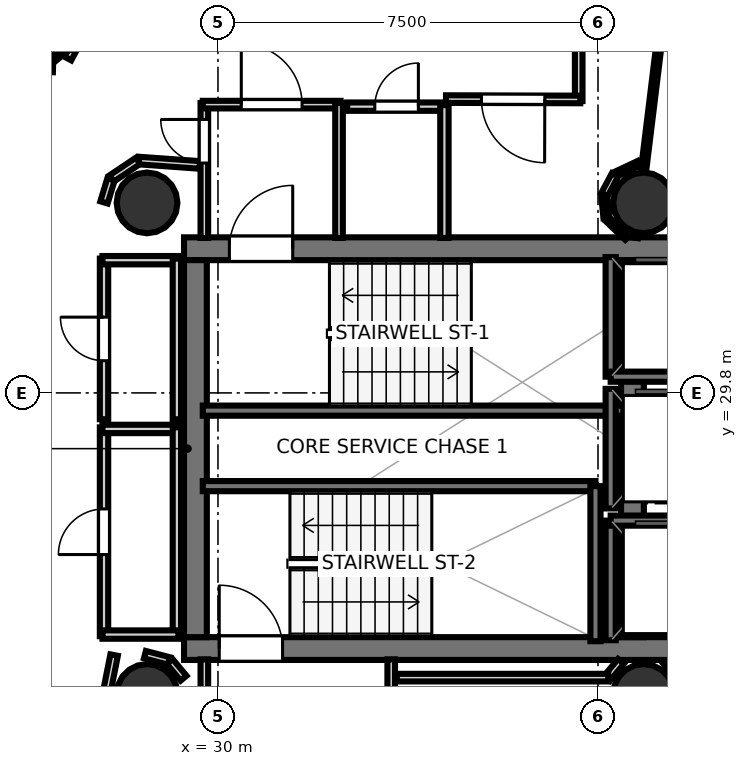
"""IFC4 building model, lengths in metres.
Left out: names, types, materials, properties, quantities, classifications, styles, units other than length and angle.
Written with IfcOpenShell. Run it as: python <this file> out.ifc"""

import sys

from ifc_helpers import new_model, si_unit, direction, frame, frame_2d, origin, origin_2d, place, context, subcontext, project, spatial, rectangle, hollow_circle, extrude, element, fill, save


model = new_model("IFC4")
c1 = context("Model", 3, precision=1e-05, world=origin(), true_north=direction((0.0, 1.0)))
c2 = subcontext(c1, "Body", "Model", "MODEL_VIEW")
j1 = project(units=[si_unit("LENGTHUNIT", "METRE"), si_unit("PLANEANGLEUNIT", "RADIAN")], contexts=[c1])
p1 = place(None, origin())
s1 = spatial("IfcSite", under=j1, at=p1, CompositionType="ELEMENT")
p2 = place(p1, origin())
s2 = spatial("IfcBuilding", under=s1, at=p2, CompositionType="ELEMENT")
p3 = place(p2, frame((0.0, 0.0, 207.7)))
s3 = spatial("IfcBuildingStorey", under=s2, at=p3, CompositionType="ELEMENT", Elevation=207.7)
p4 = place(p3, frame((29.33, 32.645, 0.0), z_axis=(0.0, 0.0, 1.0), x_axis=(1.0, 0.0, 0.0)))
e1 = element("IfcWall", 1, at=p4, inside=s3, PredefinedType="SHEAR", context=c2, shape_type="SweptSolid", body=[
    extrude(rectangle(XDim=10.52, YDim=0.45, at=frame_2d((5.26, 0.0))), origin(), (0.0, 0.0, 1.0), 3.52),
])
p5 = place(p4, frame((0.895, 0.0, 0.0)))
e2 = element("IfcOpeningElement", 2, at=p5, cuts=e1, PredefinedType="OPENING", context=c2, shape_type="SweptSolid", body=[
    extrude(rectangle(XDim=1.25, YDim=2.15, at=frame_2d((0.625, 1.075))), frame((0.0, 0.235, 0.0), z_axis=(0.0, -1.0, 0.0), x_axis=(1.0, 0.0, 0.0)), (0.0, 0.0, 1.0), 0.47),
])
p6 = place(p3, frame((29.33, 24.755, 0.0), z_axis=(0.0, 0.0, 1.0), x_axis=(1.0, 0.0, 0.0)))
e3 = element("IfcWall", 3, at=p6, inside=s3, PredefinedType="SHEAR", context=c2, shape_type="SweptSolid", body=[
    extrude(rectangle(XDim=10.52, YDim=0.45, at=frame_2d((5.26, 0.0))), origin(), (0.0, 0.0, 1.0), 3.52),
])
p7 = place(p6, frame((0.695, 0.0, 0.0)))
e4 = element("IfcOpeningElement", 4, at=p7, cuts=e3, PredefinedType="OPENING", context=c2, shape_type="SweptSolid", body=[
    extrude(rectangle(XDim=1.25, YDim=2.15, at=frame_2d((0.625, 1.075))), frame((0.0, 0.235, 0.0), z_axis=(0.0, -1.0, 0.0), x_axis=(1.0, 0.0, 0.0)), (0.0, 0.0, 1.0), 0.47),
])
for number, where, z_axis, x_axis in (
    (5, (29.555, 24.98, 0.0), (0.0, 0.0, 1.0), (0.0, 1.0, 0.0)),
    (6, (38.18, 24.98, 0.0), (0.0, 0.0, 1.0), (0.0, 1.0, 0.0)),
):
    element("IfcWall", number, at=place(p3, frame(where, z_axis=z_axis, x_axis=x_axis)), inside=s3, PredefinedType="SHEAR", context=c2, shape_type="SweptSolid", body=[
        extrude(rectangle(XDim=7.44, YDim=0.45, at=frame_2d((3.72, 0.0))), origin(), (0.0, 0.0, 1.0), 3.52),
    ])
for number, where, z_axis, x_axis in (
    (7, (28.6, 33.55, 0.0), (0.0, 0.0, 1.0), (1.0, 0.0, 0.0)),
    (8, (28.6, 23.85, 0.0), (0.0, 0.0, 1.0), (1.0, 0.0, 0.0)),
    (9, (38.4, 33.55, 0.0), (0.0, 0.0, 1.0), (1.0, 0.0, 0.0)),
    (10, (38.4, 23.85, 0.0), (0.0, 0.0, 1.0), (1.0, 0.0, 0.0)),
    (11, (26.431, 36.992, 0.0), (0.0, 0.0, 1.0), (1.0, 0.0, 0.0)),
):
    element("IfcColumn", number, at=place(p3, frame(where, z_axis=z_axis, x_axis=x_axis)), inside=s3, PredefinedType="COLUMN", context=c2, shape_type="SweptSolid", body=[
        extrude(hollow_circle(Radius=0.6, WallThickness=0.03, at=origin_2d()), origin(), (0.0, 0.0, 1.0), 3.7),
    ])
p8 = place(p3, frame((29.7, 29.45, 0.0), z_axis=(0.0, 0.0, 1.0), x_axis=(1.0, 0.0, 0.0)))
e12 = element("IfcWall", 12, at=p8, inside=s3, PredefinedType="SOLIDWALL", context=c2, shape_type="SweptSolid", body=[
    extrude(rectangle(XDim=8.3, YDim=0.2, at=frame_2d((4.15, 0.0))), origin(), (0.0, 0.0, 1.0), 3.52),
])
p9 = place(p3, frame((29.7, 27.96, 0.0), z_axis=(0.0, 0.0, 1.0), x_axis=(1.0, 0.0, 0.0)))
e13 = element("IfcWall", 13, at=p9, inside=s3, PredefinedType="SOLIDWALL", context=c2, shape_type="SweptSolid", body=[
    extrude(rectangle(XDim=7.75, YDim=0.2, at=frame_2d((3.875, 0.0))), origin(), (0.0, 0.0, 1.0), 3.52),
])
p10 = place(p3, frame((37.45, 24.9, 0.0), z_axis=(0.0, 0.0, 1.0), x_axis=(0.0, 1.0, 0.0)))
e14 = element("IfcWall", 14, at=p10, inside=s3, PredefinedType="SOLIDWALL", context=c2, shape_type="SweptSolid", body=[
    extrude(rectangle(XDim=3.06, YDim=0.2, at=frame_2d((1.53, 0.0))), origin(), (0.0, 0.0, 1.0), 3.52),
])
p11 = place(p3, frame((37.75, 30.12, 0.0), z_axis=(0.0, 0.0, 1.0), x_axis=(0.0, 1.0, 0.0)))
e15 = element("IfcWall", 15, at=p11, inside=s3, PredefinedType="SOLIDWALL", context=c2, shape_type="SweptSolid", body=[
    extrude(rectangle(XDim=2.36, YDim=0.2, at=frame_2d((1.18, 0.0))), origin(), (0.0, 0.0, 1.0), 3.52),
])
p12 = place(p3, frame((37.75, 30.12, 0.0), z_axis=(0.0, 0.0, 1.0), x_axis=(1.0, 0.0, 0.0)))
e16 = element("IfcWall", 16, at=p12, inside=s3, PredefinedType="SOLIDWALL", context=c2, shape_type="SweptSolid", body=[
    extrude(rectangle(XDim=2.1, YDim=0.2, at=frame_2d((1.05, 0.0))), origin(), (0.0, 0.0, 1.0), 3.52),
])
p13 = place(p3, frame((37.75, 24.92, 0.0), z_axis=(0.0, 0.0, 1.0), x_axis=(0.0, 1.0, 0.0)))
e17 = element("IfcWall", 17, at=p13, inside=s3, PredefinedType="SOLIDWALL", context=c2, shape_type="SweptSolid", body=[
    extrude(rectangle(XDim=2.36, YDim=0.2, at=frame_2d((1.18, 0.0))), origin(), (0.0, 0.0, 1.0), 3.52),
])
p14 = place(p3, frame((37.75, 27.28, 0.0), z_axis=(0.0, 0.0, 1.0), x_axis=(1.0, 0.0, 0.0)))
e18 = element("IfcWall", 18, at=p14, inside=s3, PredefinedType="SOLIDWALL", context=c2, shape_type="SweptSolid", body=[
    extrude(rectangle(XDim=2.1, YDim=0.2, at=frame_2d((1.05, 0.0))), origin(), (0.0, 0.0, 1.0), 3.52),
])
p15 = place(p3, frame((37.75, 27.52, 0.0), z_axis=(0.0, 0.0, 1.0), x_axis=(0.0, 1.0, 0.0)))
e19 = element("IfcWall", 19, at=p15, inside=s3, PredefinedType="SOLIDWALL", context=c2, shape_type="SweptSolid", body=[
    extrude(rectangle(XDim=2.36, YDim=0.2, at=frame_2d((1.18, 0.0))), origin(), (0.0, 0.0, 1.0), 3.52),
])
p16 = place(p3, frame((29.731, 32.858, 0.0), z_axis=(0.0, 0.0, 1.0), x_axis=(0.0, 1.0, 0.0)))
e20 = element("IfcWall", 20, at=p16, inside=s3, PredefinedType="PARTITIONING", context=c2, shape_type="SweptSolid", body=[
    extrude(rectangle(XDim=2.662, YDim=0.15, at=frame_2d((1.331, 0.0))), origin(), (0.0, 0.0, 1.0), 2.84),
])
p17 = place(p16, frame((1.478, 0.0, 0.0)))
e21 = element("IfcOpeningElement", 21, at=p17, cuts=e20, PredefinedType="OPENING", context=c2, shape_type="SweptSolid", body=[
    extrude(rectangle(XDim=0.86, YDim=2.05, at=frame_2d((0.43, 1.025))), frame((0.0, 0.085, 0.0), z_axis=(0.0, -1.0, 0.0), x_axis=(1.0, 0.0, 0.0)), (0.0, 0.0, 1.0), 0.17),
])
p18 = place(p3, frame((29.7, 35.489, 0.0), z_axis=(0.0, 0.0, 1.0), x_axis=(1.0, 0.0, 0.0)))
e22 = element("IfcWall", 22, at=p18, inside=s3, PredefinedType="PARTITIONING", context=c2, shape_type="SweptSolid", body=[
    extrude(rectangle(XDim=2.72, YDim=0.15, at=frame_2d((1.36, 0.0))), origin(), (0.0, 0.0, 1.0), 2.84),
])
p19 = place(p18, frame((0.76, 0.0, 0.0)))
e23 = element("IfcOpeningElement", 23, at=p19, cuts=e22, PredefinedType="OPENING", context=c2, shape_type="SweptSolid", body=[
    extrude(rectangle(XDim=1.2, YDim=2.15, at=frame_2d((0.6, 1.075))), frame((0.0, 0.085, 0.0), z_axis=(0.0, -1.0, 0.0), x_axis=(1.0, 0.0, 0.0)), (0.0, 0.0, 1.0), 0.17),
])
p20 = place(p3, frame((32.389, 35.52, 0.0), z_axis=(0.0, 0.0, 1.0), x_axis=(0.0, -1.0, 0.0)))
e24 = element("IfcWall", 24, at=p20, inside=s3, PredefinedType="PARTITIONING", context=c2, shape_type="SweptSolid", body=[
    extrude(rectangle(XDim=2.662, YDim=0.15, at=frame_2d((1.331, 0.0))), origin(), (0.0, 0.0, 1.0), 2.84),
])
for number, where, z_axis, x_axis in (
    (25, (29.731, 21.85, 0.0), (0.0, 0.0, 1.0), (0.0, 1.0, 0.0)),
    (26, (33.419, 24.542, 0.0), (0.0, 0.0, 1.0), (0.0, -1.0, 0.0)),
):
    element("IfcWall", number, at=place(p3, frame(where, z_axis=z_axis, x_axis=x_axis)), inside=s3, PredefinedType="PARTITIONING", context=c2, shape_type="SweptSolid", body=[
        extrude(rectangle(XDim=2.692, YDim=0.15, at=frame_2d((1.346, 0.0))), origin(), (0.0, 0.0, 1.0), 2.84),
    ])
p21 = place(p3, frame((32.55, 35.449, 0.0), z_axis=(0.0, 0.0, 1.0), x_axis=(1.0, 0.0, 0.0)))
e27 = element("IfcWall", 27, at=p21, inside=s3, PredefinedType="PLUMBINGWALL", context=c2, shape_type="SweptSolid", body=[
    extrude(rectangle(XDim=1.95, YDim=0.165, at=frame_2d((0.975, 0.0))), origin(), (0.0, 0.0, 1.0), 2.84),
])
p22 = place(p21, frame((0.545, 0.0, 0.0)))
e28 = element("IfcOpeningElement", 28, at=p22, cuts=e27, PredefinedType="OPENING", context=c2, shape_type="SweptSolid", body=[
    extrude(rectangle(XDim=0.86, YDim=2.05, at=frame_2d((0.43, 1.025))), frame((0.0, 0.093, 0.0), z_axis=(0.0, -1.0, 0.0), x_axis=(1.0, 0.0, 0.0)), (0.0, 0.0, 1.0), 0.185),
])
p23 = place(p3, frame((34.469, 35.48, 0.0), z_axis=(0.0, 0.0, 1.0), x_axis=(0.0, -1.0, 0.0)))
e29 = element("IfcWall", 29, at=p23, inside=s3, PredefinedType="PLUMBINGWALL", context=c2, shape_type="SweptSolid", body=[
    extrude(rectangle(XDim=2.622, YDim=0.165, at=frame_2d((1.311, 0.0))), origin(), (0.0, 0.0, 1.0), 2.84),
])
p24 = place(p3, frame((27.751, 25.0, 0.0), z_axis=(0.0, 0.0, 1.0), x_axis=(0.0, 1.0, 0.0)))
e30 = element("IfcWall", 30, at=p24, inside=s3, PredefinedType="PLUMBINGWALL", context=c2, shape_type="SweptSolid", body=[
    extrude(rectangle(XDim=4.12, YDim=0.165, at=frame_2d((2.06, 0.0))), origin(), (0.0, 0.0, 1.0), 2.84),
])
p25 = place(p24, frame((1.61, 0.0, 0.0)))
e31 = element("IfcOpeningElement", 31, at=p25, cuts=e30, PredefinedType="OPENING", context=c2, shape_type="SweptSolid", body=[
    extrude(rectangle(XDim=0.9, YDim=2.1, at=frame_2d((0.45, 1.05))), frame((0.0, 0.093, 0.0), z_axis=(0.0, -1.0, 0.0), x_axis=(1.0, 0.0, 0.0)), (0.0, 0.0, 1.0), 0.185),
])
p26 = place(p3, frame((27.72, 29.089, 0.0), z_axis=(0.0, 0.0, 1.0), x_axis=(1.0, 0.0, 0.0)))
e32 = element("IfcWall", 32, at=p26, inside=s3, PredefinedType="PLUMBINGWALL", context=c2, shape_type="SweptSolid", body=[
    extrude(rectangle(XDim=1.5, YDim=0.165, at=frame_2d((0.75, 0.0))), origin(), (0.0, 0.0, 1.0), 2.84),
])
p27 = place(p3, frame((29.189, 29.12, 0.0), z_axis=(0.0, 0.0, 1.0), x_axis=(0.0, -1.0, 0.0)))
e33 = element("IfcWall", 33, at=p27, inside=s3, PredefinedType="PLUMBINGWALL", context=c2, shape_type="SweptSolid", body=[
    extrude(rectangle(XDim=4.12, YDim=0.165, at=frame_2d((2.06, 0.0))), origin(), (0.0, 0.0, 1.0), 2.84),
])
p28 = place(p3, frame((29.22, 25.031, 0.0), z_axis=(0.0, 0.0, 1.0), x_axis=(-1.0, 0.0, 0.0)))
e34 = element("IfcWall", 34, at=p28, inside=s3, PredefinedType="PLUMBINGWALL", context=c2, shape_type="SweptSolid", body=[
    extrude(rectangle(XDim=1.5, YDim=0.165, at=frame_2d((0.75, 0.0))), origin(), (0.0, 0.0, 1.0), 2.84),
])
p29 = place(p3, frame((27.751, 29.28, 0.0), z_axis=(0.0, 0.0, 1.0), x_axis=(0.0, 1.0, 0.0)))
e35 = element("IfcWall", 35, at=p29, inside=s3, PredefinedType="PLUMBINGWALL", context=c2, shape_type="SweptSolid", body=[
    extrude(rectangle(XDim=3.17, YDim=0.165, at=frame_2d((1.585, 0.0))), origin(), (0.0, 0.0, 1.0), 2.84),
])
p30 = place(p29, frame((1.155, 0.0, 0.0)))
e36 = element("IfcOpeningElement", 36, at=p30, cuts=e35, PredefinedType="OPENING", context=c2, shape_type="SweptSolid", body=[
    extrude(rectangle(XDim=0.86, YDim=2.05, at=frame_2d((0.43, 1.025))), frame((0.0, 0.093, 0.0), z_axis=(0.0, -1.0, 0.0), x_axis=(1.0, 0.0, 0.0)), (0.0, 0.0, 1.0), 0.185),
])
p31 = place(p3, frame((27.72, 32.419, 0.0), z_axis=(0.0, 0.0, 1.0), x_axis=(1.0, 0.0, 0.0)))
e37 = element("IfcWall", 37, at=p31, inside=s3, PredefinedType="PLUMBINGWALL", context=c2, shape_type="SweptSolid", body=[
    extrude(rectangle(XDim=1.5, YDim=0.165, at=frame_2d((0.75, 0.0))), origin(), (0.0, 0.0, 1.0), 2.84),
])
p32 = place(p3, frame((29.189, 32.45, 0.0), z_axis=(0.0, 0.0, 1.0), x_axis=(0.0, -1.0, 0.0)))
e38 = element("IfcWall", 38, at=p32, inside=s3, PredefinedType="PLUMBINGWALL", context=c2, shape_type="SweptSolid", body=[
    extrude(rectangle(XDim=3.17, YDim=0.165, at=frame_2d((1.585, 0.0))), origin(), (0.0, 0.0, 1.0), 2.84),
])
p33 = place(p3, frame((29.321, 24.17, 0.0), z_axis=(0.0, 0.0, 1.0), x_axis=(-0.638008265708, 0.770029514296, 0.0)))
e39 = element("IfcWall", 39, at=p33, inside=s3, PredefinedType="PARTITIONING", context=c2, shape_type="SweptSolid", body=[
    extrude(rectangle(XDim=0.431, YDim=0.15, at=frame_2d((0.215, 0.0))), origin(), (0.0, 0.0, 1.0), 2.84),
])
p34 = place(p3, frame((29.03, 24.512, 0.0), z_axis=(0.0, 0.0, 1.0), x_axis=(-0.967681003213, 0.252177469296, 0.0)))
e40 = element("IfcWall", 40, at=p34, inside=s3, PredefinedType="PARTITIONING", context=c2, shape_type="SweptSolid", body=[
    extrude(rectangle(XDim=0.488, YDim=0.15, at=frame_2d((0.244, 0.0))), origin(), (0.0, 0.0, 1.0), 2.84),
])
for number, where, z_axis, x_axis in (
    (41, (39.121, 24.17, 0.0), (0.0, 0.0, 1.0), (-0.638, 0.77, 0.0)),
    (42, (37.954, 24.502, 0.0), (0.0, 0.0, 1.0), (-0.638, -0.77, 0.0)),
):
    element("IfcWall", number, at=place(p3, frame(where, z_axis=z_axis, x_axis=x_axis)), inside=s3, PredefinedType="PARTITIONING", context=c2, shape_type="SweptSolid", body=[
        extrude(rectangle(XDim=0.431, YDim=0.15, at=frame_2d((0.215, 0.0))), origin(), (0.0, 0.0, 1.0), 2.84),
    ])
p35 = place(p3, frame((37.703, 24.181, 0.0), z_axis=(0.0, 0.0, 1.0), x_axis=(-1.0, 0.0, 0.0)))
e43 = element("IfcWall", 43, at=p35, inside=s3, PredefinedType="PARTITIONING", context=c2, shape_type="SweptSolid", body=[
    extrude(rectangle(XDim=4.173, YDim=0.15, at=frame_2d((2.086, 0.0))), origin(), (0.0, 0.0, 1.0), 2.84),
])
p36 = place(p3, frame((37.119, 37.98, 0.0), z_axis=(0.0, 0.0, 1.0), x_axis=(0.0, -1.0, 0.0)))
e44 = element("IfcWall", 44, at=p36, inside=s3, PredefinedType="PARTITIONING", context=c2, shape_type="SweptSolid", body=[
    extrude(rectangle(XDim=2.42, YDim=0.15, at=frame_2d((1.21, 0.0))), origin(), (0.0, 0.0, 1.0), 2.84),
])
p37 = place(p3, frame((37.15, 35.591, 0.0), z_axis=(0.0, 0.0, 1.0), x_axis=(-0.999996180994, 0.002763692808, 0.0)))
e45 = element("IfcWall", 45, at=p37, inside=s3, PredefinedType="PARTITIONING", context=c2, shape_type="SweptSolid", body=[
    extrude(rectangle(XDim=2.65, YDim=0.15, at=frame_2d((1.325, 0.0))), origin(), (0.0, 0.0, 1.0), 2.84),
])
p38 = place(p37, frame((0.7, 0.0, 0.0)))
e46 = element("IfcOpeningElement", 46, at=p38, cuts=e45, PredefinedType="OPENING", context=c2, shape_type="SweptSolid", body=[
    extrude(rectangle(XDim=1.25, YDim=2.2, at=frame_2d((0.625, 1.1))), frame((0.0, 0.085, 0.0), z_axis=(0.0, -1.0, 0.0), x_axis=(1.0, 0.0, 0.0)), (0.0, 0.0, 1.0), 0.17),
])
p39 = place(p3, frame((29.64, 34.299, 0.0), z_axis=(0.0, 0.0, 1.0), x_axis=(-0.997392224386, 0.072171675429, 0.0)))
e47 = element("IfcWall", 47, at=p39, inside=s3, PredefinedType="PARTITIONING", context=c2, shape_type="SweptSolid", body=[
    extrude(rectangle(XDim=1.201, YDim=0.15, at=frame_2d((0.601, 0.0))), origin(), (0.0, 0.0, 1.0), 2.84),
])
p40 = place(p3, frame((28.423, 34.38, 0.0), z_axis=(0.0, 0.0, 1.0), x_axis=(-0.831571279003, -0.555418047903, 0.0)))
e48 = element("IfcWall", 48, at=p40, inside=s3, PredefinedType="PARTITIONING", context=c2, shape_type="SweptSolid", body=[
    extrude(rectangle(XDim=0.628, YDim=0.15, at=frame_2d((0.314, 0.0))), origin(), (0.0, 0.0, 1.0), 2.84),
])
p41 = place(p3, frame((27.888, 34.015, 0.0), z_axis=(0.0, 0.0, 1.0), x_axis=(-0.290263585829, -0.956946733492, 0.0)))
e49 = element("IfcWall", 49, at=p41, inside=s3, PredefinedType="PARTITIONING", context=c2, shape_type="SweptSolid", body=[
    extrude(rectangle(XDim=0.476, YDim=0.15, at=frame_2d((0.238, 0.0))), origin(), (0.0, 0.0, 1.0), 2.84),
])
p42 = place(p3, frame((27.95, 24.626, 0.0), z_axis=(0.0, 0.0, 1.0), x_axis=(-0.195125950178, -0.980778192848, 0.0)))
e50 = element("IfcWall", 50, at=p42, inside=s3, PredefinedType="PARTITIONING", context=c2, shape_type="SweptSolid", body=[
    extrude(rectangle(XDim=0.948, YDim=0.15, at=frame_2d((0.474, 0.0))), origin(), (0.0, 0.0, 1.0), 2.84),
])
p43 = place(p3, frame((25.449, 36.238, 0.0), z_axis=(0.0, 0.0, 1.0), x_axis=(0.999651698073, -0.026390955635, 0.0)))
e51 = element("IfcWall", 51, at=p43, inside=s3, PredefinedType="PARTITIONING", context=c2, shape_type="SweptSolid", body=[
    extrude(rectangle(XDim=1.295, YDim=0.15, at=frame_2d((0.647, 0.0))), origin(), (0.0, 0.0, 1.0), 2.84),
])
p44 = place(p3, frame((27.038, 36.398, 0.0), z_axis=(0.0, 0.0, 1.0), x_axis=(0.471865548338, 0.881670519123, 0.0)))
e52 = element("IfcWall", 52, at=p44, inside=s3, PredefinedType="PARTITIONING", context=c2, shape_type="SweptSolid", body=[
    extrude(rectangle(XDim=0.476, YDim=0.15, at=frame_2d((0.238, 0.0))), origin(), (0.0, 0.0, 1.0), 2.84),
])
p45 = place(p3, frame((38.236, 32.858, 0.0), z_axis=(0.0, 0.0, 1.0), x_axis=(0.121669626561, 0.992570653391, 0.0)))
e53 = element("IfcWall", 53, at=p45, inside=s3, PredefinedType="PARTITIONING", context=c2, shape_type="SweptSolid", body=[
    extrude(rectangle(XDim=4.854, YDim=0.105, at=frame_2d((2.427, 0.0))), origin(), (0.0, 0.0, 1.0), 2.84),
])
p46 = place(p3, frame((38.306, 34.33, 0.0), z_axis=(0.0, 0.0, 1.0), x_axis=(-0.905092592968, -0.425214531918, 0.0)))
e54 = element("IfcWall", 54, at=p46, inside=s3, PredefinedType="PARTITIONING", context=c2, shape_type="SweptSolid", body=[
    extrude(rectangle(XDim=0.505, YDim=0.105, at=frame_2d((0.252, 0.0))), origin(), (0.0, 0.0, 1.0), 2.84),
])
p47 = place(p3, frame((37.835, 34.102, 0.0), z_axis=(0.0, 0.0, 1.0), x_axis=(-0.471392110461, -0.881923737177, 0.0)))
e55 = element("IfcWall", 55, at=p47, inside=s3, PredefinedType="PARTITIONING", context=c2, shape_type="SweptSolid", body=[
    extrude(rectangle(XDim=0.441, YDim=0.14, at=frame_2d((0.221, 0.0))), origin(), (0.0, 0.0, 1.0), 2.84),
])
p48 = place(p3, frame((37.624, 33.695, 0.0), z_axis=(0.0, 0.0, 1.0), x_axis=(0.097915215421, -0.995194760129, 0.0)))
e56 = element("IfcWall", 56, at=p48, inside=s3, PredefinedType="PARTITIONING", context=c2, shape_type="SweptSolid", body=[
    extrude(rectangle(XDim=0.441, YDim=0.12, at=frame_2d((0.221, 0.0))), origin(), (0.0, 0.0, 1.0), 2.84),
])
p49 = place(p3, frame((37.677, 33.237, 0.0), z_axis=(0.0, 0.0, 1.0), x_axis=(0.72443362256, -0.689344562976, 0.0)))
e57 = element("IfcWall", 57, at=p49, inside=s3, PredefinedType="PARTITIONING", context=c2, shape_type="SweptSolid", body=[
    extrude(rectangle(XDim=0.55, YDim=0.105, at=frame_2d((0.275, 0.0))), origin(), (0.0, 0.0, 1.0), 2.84),
])
p50 = place(p3, frame((27.024, 36.602, 0.0), z_axis=(0.0, 0.0, 1.0), x_axis=(-0.775745027902, -0.631046473475, 0.0)))
e58 = element("IfcWall", 58, at=p50, inside=s3, PredefinedType="PARTITIONING", context=c2, shape_type="SweptSolid", body=[
    extrude(rectangle(XDim=0.425, YDim=0.105, at=frame_2d((0.213, 0.0))), origin(), (0.0, 0.0, 1.0), 2.84),
])
p51 = place(p5, origin())
e59 = element("IfcDoor", 59, at=p51, inside=s3, OperationType="SINGLE_SWING_RIGHT", PredefinedType="DOOR", context=c2, shape_type="SweptSolid", body=[
    extrude(rectangle(XDim=1.25, YDim=2.15, at=frame_2d((0.625, 1.075))), frame((0.0, 0.025, 0.0), z_axis=(0.0, -1.0, 0.0), x_axis=(1.0, 0.0, 0.0)), (0.0, 0.0, 1.0), 0.05),
])
fill(e2, e59)
p52 = place(p7, origin())
e60 = element("IfcDoor", 60, at=p52, inside=s3, OperationType="SINGLE_SWING_LEFT", PredefinedType="DOOR", context=c2, shape_type="SweptSolid", body=[
    extrude(rectangle(XDim=1.25, YDim=2.15, at=frame_2d((0.625, 1.075))), frame((0.0, 0.025, 0.0), z_axis=(0.0, -1.0, 0.0), x_axis=(1.0, 0.0, 0.0)), (0.0, 0.0, 1.0), 0.05),
])
fill(e4, e60)
p53 = place(p19, origin())
e61 = element("IfcDoor", 61, at=p53, inside=s3, OperationType="SINGLE_SWING_LEFT", PredefinedType="DOOR", context=c2, shape_type="SweptSolid", body=[
    extrude(rectangle(XDim=1.2, YDim=2.15, at=frame_2d((0.6, 1.075))), frame((0.0, 0.025, 0.0), z_axis=(0.0, -1.0, 0.0), x_axis=(1.0, 0.0, 0.0)), (0.0, 0.0, 1.0), 0.05),
])
fill(e23, e61)
p54 = place(p22, origin())
e62 = element("IfcDoor", 62, at=p54, inside=s3, OperationType="SINGLE_SWING_RIGHT", PredefinedType="DOOR", context=c2, shape_type="SweptSolid", body=[
    extrude(rectangle(XDim=0.86, YDim=2.05, at=frame_2d((0.43, 1.025))), frame((0.0, 0.025, 0.0), z_axis=(0.0, -1.0, 0.0), x_axis=(1.0, 0.0, 0.0)), (0.0, 0.0, 1.0), 0.05),
])
fill(e28, e62)
p55 = place(p25, origin())
e63 = element("IfcDoor", 63, at=p55, inside=s3, OperationType="SINGLE_SWING_LEFT", PredefinedType="DOOR", context=c2, shape_type="SweptSolid", body=[
    extrude(rectangle(XDim=0.9, YDim=2.1, at=frame_2d((0.45, 1.05))), frame((0.0, 0.025, 0.0), z_axis=(0.0, -1.0, 0.0), x_axis=(1.0, 0.0, 0.0)), (0.0, 0.0, 1.0), 0.05),
])
fill(e31, e63)
p56 = place(p30, origin())
e64 = element("IfcDoor", 64, at=p56, inside=s3, OperationType="SINGLE_SWING_RIGHT", PredefinedType="DOOR", context=c2, shape_type="SweptSolid", body=[
    extrude(rectangle(XDim=0.86, YDim=2.05, at=frame_2d((0.43, 1.025))), frame((0.0, 0.025, 0.0), z_axis=(0.0, -1.0, 0.0), x_axis=(1.0, 0.0, 0.0)), (0.0, 0.0, 1.0), 0.05),
])
fill(e36, e64)
p57 = place(p17, origin())
e65 = element("IfcDoor", 65, at=p57, inside=s3, OperationType="SINGLE_SWING_RIGHT", PredefinedType="DOOR", context=c2, shape_type="SweptSolid", body=[
    extrude(rectangle(XDim=0.86, YDim=2.05, at=frame_2d((0.43, 1.025))), frame((0.0, 0.025, 0.0), z_axis=(0.0, -1.0, 0.0), x_axis=(1.0, 0.0, 0.0)), (0.0, 0.0, 1.0), 0.05),
])
fill(e21, e65)
p58 = place(p38, origin())
e66 = element("IfcDoor", 66, at=p58, inside=s3, OperationType="SINGLE_SWING_LEFT", PredefinedType="DOOR", context=c2, shape_type="SweptSolid", body=[
    extrude(rectangle(XDim=1.25, YDim=2.2, at=frame_2d((0.625, 1.1))), frame((0.0, 0.025, 0.0), z_axis=(0.0, -1.0, 0.0), x_axis=(1.0, 0.0, 0.0)), (0.0, 0.0, 1.0), 0.05),
])
fill(e46, e66)
save(model, sys.argv[1])
